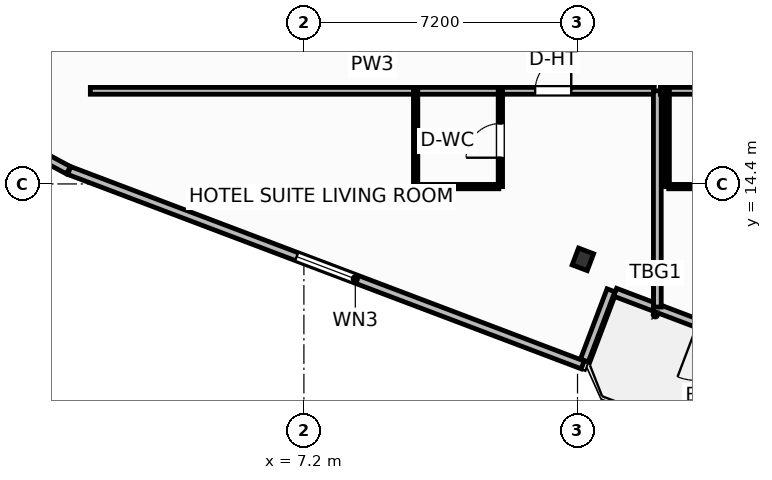
"""IFC4 building model, lengths in metres.
Left out: names, types, materials, properties, quantities, classifications, styles, units other than length and angle.
Written with IfcOpenShell. Run it as: python <this file> out.ifc"""

import sys

from ifc_helpers import new_model, si_unit, direction, frame, frame_2d, origin, origin_2d, place, context, subcontext, project, spatial, rectangle, i_section, extrude, element, fill, save


model = new_model("IFC4")
c1 = context("Model", 3, precision=1e-05, world=origin(), true_north=direction((0.0, 1.0)))
c2 = subcontext(c1, "Body", "Model", "MODEL_VIEW")
j1 = project(units=[si_unit("LENGTHUNIT", "METRE"), si_unit("PLANEANGLEUNIT", "RADIAN")], contexts=[c1])
p1 = place(None, origin())
s1 = spatial("IfcSite", under=j1, at=p1, CompositionType="ELEMENT")
p2 = place(p1, origin())
s2 = spatial("IfcBuilding", under=s1, at=p2, CompositionType="ELEMENT")
p3 = place(p2, frame((0.0, 0.0, 83.6)))
s3 = spatial("IfcBuildingStorey", under=s2, at=p3, CompositionType="ELEMENT", Elevation=83.6)
p4 = place(p3, frame((14.541, 12.416, 0.0), z_axis=(0.0, 0.0, 1.0), x_axis=(0.935221751401, -0.354062530786, 0.0)))
e1 = element("IfcColumn", 1, at=p4, inside=s3, PredefinedType="COLUMN", context=c2, shape_type="SweptSolid", body=[
    extrude(i_section(OverallWidth=0.424, OverallDepth=0.474, WebThickness=0.048, FlangeThickness=0.077, FilletRadius=0.025, at=origin_2d()), origin(), (0.0, 0.0, 1.0), 3.7),
])
p5 = place(p3, frame((21.0, 9.425, 0.0), z_axis=(0.0, 0.0, 1.0), x_axis=(-0.93521416643, 0.354082565101, 0.0)))
e2 = element("IfcWall", 2, at=p5, inside=s3, PredefinedType="SOLIDWALL", context=c2, shape_type="SweptSolid", body=[
    extrude(rectangle(XDim=6.0, YDim=0.22, at=frame_2d((3.0, 0.0))), origin(), (0.0, 0.0, 1.0), 2.73),
])
p6 = place(p5, frame((2.176, 0.0, 0.0)))
e3 = element("IfcOpeningElement", 3, at=p6, cuts=e2, PredefinedType="OPENING", context=c2, shape_type="SweptSolid", body=[
    extrude(rectangle(XDim=1.5, YDim=2.25, at=frame_2d((0.75, 1.125))), frame((0.0, 0.12, 0.0), z_axis=(0.0, -1.0, 0.0), x_axis=(1.0, 0.0, 0.0)), (0.0, 0.0, 1.0), 0.24),
])
p7 = place(p3, frame((-0.197, 15.406, 0.0), z_axis=(0.0, 0.0, 1.0), x_axis=(0.881023507585, -0.47307248819, 0.0)))
e4 = element("IfcWall", 4, at=p7, inside=s3, PredefinedType="SOLIDWALL", context=c2, shape_type="SweptSolid", body=[
    extrude(rectangle(XDim=1.361, YDim=0.22, at=frame_2d((0.68, 0.0))), origin(), (0.0, 0.0, 1.0), 2.73),
])
p8 = place(p3, frame((1.026, 14.753, 0.0), z_axis=(0.0, 0.0, 1.0), x_axis=(0.935222448475, -0.354060689526, 0.0)))
e5 = element("IfcWall", 5, at=p8, inside=s3, PredefinedType="SOLIDWALL", context=c2, shape_type="SweptSolid", body=[
    extrude(rectangle(XDim=14.447, YDim=0.22, at=frame_2d((7.224, 0.0))), origin(), (0.0, 0.0, 1.0), 2.73),
])
p9 = place(p8, frame((6.399, 0.0, 0.8)))
e6 = element("IfcOpeningElement", 6, at=p9, cuts=e5, PredefinedType="OPENING", context=c2, shape_type="SweptSolid", body=[
    extrude(rectangle(XDim=1.65, YDim=1.65, at=frame_2d((0.825, 0.825))), frame((0.0, 0.12, 0.0), z_axis=(0.0, -1.0, 0.0), x_axis=(1.0, 0.0, 0.0)), (0.0, 0.0, 1.0), 0.24),
])
p10 = place(p3, frame((14.581, 9.755, 0.0), z_axis=(0.0, 0.0, 1.0), x_axis=(0.354061611705, 0.935222099352, 0.0)))
e7 = element("IfcWall", 7, at=p10, inside=s3, PredefinedType="SOLIDWALL", context=c2, shape_type="SweptSolid", body=[
    extrude(rectangle(XDim=1.975, YDim=0.22, at=frame_2d((0.987, 0.0))), origin(), (0.0, 0.0, 1.0), 2.73),
])
p11 = place(p3, frame((1.58, 16.85, 0.0), z_axis=(0.0, 0.0, 1.0), x_axis=(1.0, 0.0, 0.0)))
e8 = element("IfcWall", 8, at=p11, inside=s3, PredefinedType="PARTITIONING", context=c2, shape_type="SweptSolid", body=[
    extrude(rectangle(XDim=14.84, YDim=0.18, at=frame_2d((7.42, 0.0))), origin(), (0.0, 0.0, 1.0), 3.45),
])
p12 = place(p11, frame((11.705, 0.0, 0.0)))
e9 = element("IfcOpeningElement", 9, at=p12, cuts=e8, PredefinedType="OPENING", context=c2, shape_type="SweptSolid", body=[
    extrude(rectangle(XDim=0.95, YDim=2.15, at=frame_2d((0.475, 1.075))), frame((0.0, 0.1, 0.0), z_axis=(0.0, -1.0, 0.0), x_axis=(1.0, 0.0, 0.0)), (0.0, 0.0, 1.0), 0.2),
])
p13 = place(p3, frame((10.18, 14.33, 0.0), z_axis=(0.0, 0.0, 1.0), x_axis=(1.0, 0.0, 0.0)))
e10 = element("IfcWall", 10, at=p13, inside=s3, PredefinedType="PARTITIONING", context=c2, shape_type="SweptSolid", body=[
    extrude(rectangle(XDim=2.15, YDim=0.115, at=frame_2d((1.075, 0.0))), origin(), (0.0, 0.0, 1.0), 3.45),
])
p14 = place(p3, frame((12.37, 14.33, 0.0), z_axis=(0.0, 0.0, 1.0), x_axis=(0.0, 1.0, 0.0)))
e11 = element("IfcWall", 11, at=p14, inside=s3, PredefinedType="PARTITIONING", context=c2, shape_type="SweptSolid", body=[
    extrude(rectangle(XDim=2.52, YDim=0.115, at=frame_2d((1.26, 0.0))), origin(), (0.0, 0.0, 1.0), 3.45),
])
p15 = place(p14, frame((0.76, 0.0, 0.0)))
e12 = element("IfcOpeningElement", 12, at=p15, cuts=e11, PredefinedType="OPENING", context=c2, shape_type="SweptSolid", body=[
    extrude(rectangle(XDim=0.9, YDim=2.05, at=frame_2d((0.45, 1.025))), frame((0.0, 0.067, 0.0), z_axis=(0.0, -1.0, 0.0), x_axis=(1.0, 0.0, 0.0)), (0.0, 0.0, 1.0), 0.135),
])
p16 = place(p3, frame((10.14, 14.33, 0.0), z_axis=(0.0, 0.0, 1.0), x_axis=(0.0, 1.0, 0.0)))
e13 = element("IfcWall", 13, at=p16, inside=s3, PredefinedType="PARTITIONING", context=c2, shape_type="SweptSolid", body=[
    extrude(rectangle(XDim=2.52, YDim=0.115, at=frame_2d((1.26, 0.0))), origin(), (0.0, 0.0, 1.0), 3.45),
])
p17 = place(p3, frame((16.5, 11.161, 0.0), z_axis=(0.0, 0.0, 1.0), x_axis=(0.0, 1.0, 0.0)))
e14 = element("IfcWall", 14, at=p17, inside=s3, PredefinedType="PARTITIONING", context=c2, shape_type="SweptSolid", body=[
    extrude(rectangle(XDim=5.689, YDim=0.205, at=frame_2d((2.844, 0.0))), origin(), (0.0, 0.0, 1.0), 3.45),
])
p18 = place(p3, frame((16.58, 16.85, 0.0), z_axis=(0.0, 0.0, 1.0), x_axis=(1.0, 0.0, 0.0)))
e15 = element("IfcWall", 15, at=p18, inside=s3, PredefinedType="PARTITIONING", context=c2, shape_type="SweptSolid", body=[
    extrude(rectangle(XDim=8.84, YDim=0.18, at=frame_2d((4.42, 0.0))), origin(), (0.0, 0.0, 1.0), 3.45),
])
p19 = place(p18, frame((3.23, 0.0, 0.0)))
e16 = element("IfcOpeningElement", 16, at=p19, cuts=e15, PredefinedType="OPENING", context=c2, shape_type="SweptSolid", body=[
    extrude(rectangle(XDim=0.95, YDim=2.15, at=frame_2d((0.475, 1.075))), frame((0.0, 0.1, 0.0), z_axis=(0.0, -1.0, 0.0), x_axis=(1.0, 0.0, 0.0)), (0.0, 0.0, 1.0), 0.2),
])
p20 = place(p3, frame((16.8, 14.33, 0.0), z_axis=(0.0, 0.0, 1.0), x_axis=(1.0, 0.0, 0.0)))
e17 = element("IfcWall", 17, at=p20, inside=s3, PredefinedType="PARTITIONING", context=c2, shape_type="SweptSolid", body=[
    extrude(rectangle(XDim=2.15, YDim=0.115, at=frame_2d((1.075, 0.0))), origin(), (0.0, 0.0, 1.0), 3.45),
])
p21 = place(p3, frame((16.76, 14.33, 0.0), z_axis=(0.0, 0.0, 1.0), x_axis=(0.0, 1.0, 0.0)))
e18 = element("IfcWall", 18, at=p21, inside=s3, PredefinedType="PARTITIONING", context=c2, shape_type="SweptSolid", body=[
    extrude(rectangle(XDim=2.52, YDim=0.115, at=frame_2d((1.26, 0.0))), origin(), (0.0, 0.0, 1.0), 3.45),
])
p22 = place(p9, origin())
e19 = element("IfcWindow", 19, at=p22, inside=s3, PartitioningType="SINGLE_PANEL", PredefinedType="WINDOW", context=c2, shape_type="SweptSolid", body=[
    extrude(rectangle(XDim=1.65, YDim=1.65, at=frame_2d((0.825, 0.825))), frame((0.0, 0.03, 0.0), z_axis=(0.0, -1.0, 0.0), x_axis=(1.0, 0.0, 0.0)), (0.0, 0.0, 1.0), 0.06),
])
fill(e6, e19)
p23 = place(p12, origin())
e20 = element("IfcDoor", 20, at=p23, inside=s3, OperationType="SINGLE_SWING_RIGHT", PredefinedType="DOOR", context=c2, shape_type="SweptSolid", body=[
    extrude(rectangle(XDim=0.95, YDim=2.15, at=frame_2d((0.475, 1.075))), frame((0.0, 0.025, 0.0), z_axis=(0.0, -1.0, 0.0), x_axis=(1.0, 0.0, 0.0)), (0.0, 0.0, 1.0), 0.05),
])
fill(e9, e20)
p24 = place(p15, origin())
e21 = element("IfcDoor", 21, at=p24, inside=s3, OperationType="SINGLE_SWING_LEFT", PredefinedType="DOOR", context=c2, shape_type="SweptSolid", body=[
    extrude(rectangle(XDim=0.9, YDim=2.05, at=frame_2d((0.45, 1.025))), frame((0.0, 0.025, 0.0), z_axis=(0.0, -1.0, 0.0), x_axis=(1.0, 0.0, 0.0)), (0.0, 0.0, 1.0), 0.05),
])
fill(e12, e21)
save(model, sys.argv[1])
